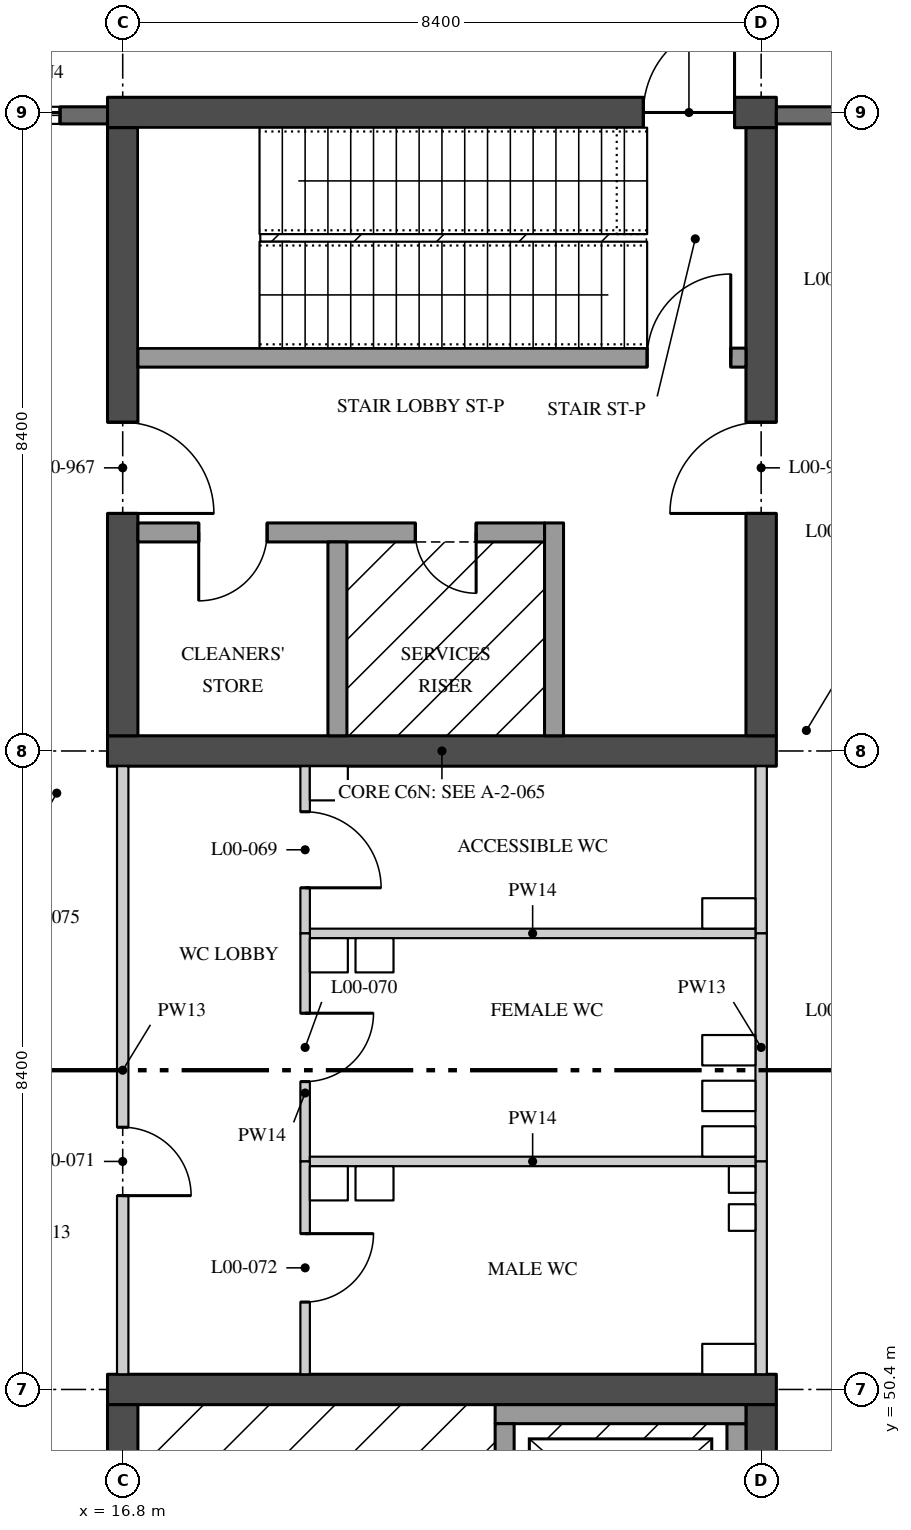
"""IFC4 building model, lengths in metres.
Left out: names, types, materials, properties, quantities, classifications, styles, units other than length and angle.
Written with IfcOpenShell. Run it as: python <this file> out.ifc"""

import sys

from ifc_helpers import new_model, si_unit, direction, frame, frame_2d, origin, place, context, subcontext, project, spatial, rectangle, extrude, element, fill, save


model = new_model("IFC4")
c1 = context("Model", 3, precision=1e-05, world=origin(), true_north=direction((0.0, 1.0)))
c2 = subcontext(c1, "Body", "Model", "MODEL_VIEW")
j1 = project(units=[si_unit("LENGTHUNIT", "METRE"), si_unit("PLANEANGLEUNIT", "RADIAN")], contexts=[c1])
p1 = place(None, origin())
s1 = spatial("IfcSite", under=j1, at=p1, CompositionType="ELEMENT")
p2 = place(p1, origin())
s2 = spatial("IfcBuilding", under=s1, at=p2, CompositionType="ELEMENT")
p3 = place(p2, origin())
s3 = spatial("IfcBuildingStorey", under=s2, at=p3, CompositionType="ELEMENT", Elevation=0.0)
p4 = place(p3, frame((16.6, 50.4, 0.0), z_axis=(0.0, 0.0, 1.0), x_axis=(1.0, 0.0, 0.0)))
e1 = element("IfcWall", 1, at=p4, inside=s3, PredefinedType="SHEAR", context=c2, shape_type="SweptSolid", body=[
    extrude(rectangle(XDim=8.8, YDim=0.4, at=frame_2d((4.4, 0.0))), origin(), (0.0, 0.0, 1.0), 5.05),
])
p5 = place(p3, frame((16.8, 42.2, 0.0), z_axis=(0.0, 0.0, 1.0), x_axis=(0.0, 1.0, 0.0)))
e2 = element("IfcWall", 2, at=p5, inside=s3, PredefinedType="SHEAR", context=c2, shape_type="SweptSolid", body=[
    extrude(rectangle(XDim=8.0, YDim=0.4, at=frame_2d((4.0, 0.0))), origin(), (0.0, 0.0, 1.0), 5.05),
])
p6 = place(p5, frame((3.55, 0.0, 0.0)))
e3 = element("IfcOpeningElement", 3, at=p6, cuts=e2, PredefinedType="OPENING", context=c2, shape_type="SweptSolid", body=[
    extrude(rectangle(XDim=1.2, YDim=2.1, at=frame_2d((0.6, 1.05))), frame((0.0, 0.21, 0.0), z_axis=(0.0, -1.0, 0.0), x_axis=(1.0, 0.0, 0.0)), (0.0, 0.0, 1.0), 0.42),
])
p7 = place(p5, frame((0.8, 0.0, 0.0)))
e4 = element("IfcOpeningElement", 4, at=p7, cuts=e2, PredefinedType="OPENING", context=c2, shape_type="SweptSolid", body=[
    extrude(rectangle(XDim=1.2, YDim=2.1, at=frame_2d((0.6, 1.05))), frame((0.0, 0.21, 0.0), z_axis=(0.0, -1.0, 0.0), x_axis=(1.0, 0.0, 0.0)), (0.0, 0.0, 1.0), 0.42),
])
p8 = place(p3, frame((25.2, 42.2, 0.0), z_axis=(0.0, 0.0, 1.0), x_axis=(0.0, 1.0, 0.0)))
e5 = element("IfcWall", 5, at=p8, inside=s3, PredefinedType="SHEAR", context=c2, shape_type="SweptSolid", body=[
    extrude(rectangle(XDim=8.0, YDim=0.4, at=frame_2d((4.0, 0.0))), origin(), (0.0, 0.0, 1.0), 5.05),
])
p9 = place(p8, frame((3.55, 0.0, 0.0)))
e6 = element("IfcOpeningElement", 6, at=p9, cuts=e5, PredefinedType="OPENING", context=c2, shape_type="SweptSolid", body=[
    extrude(rectangle(XDim=1.2, YDim=2.1, at=frame_2d((0.6, 1.05))), frame((0.0, 0.21, 0.0), z_axis=(0.0, -1.0, 0.0), x_axis=(1.0, 0.0, 0.0)), (0.0, 0.0, 1.0), 0.42),
])
p10 = place(p3, frame((16.6, 58.8, 0.0), z_axis=(0.0, 0.0, 1.0), x_axis=(1.0, 0.0, 0.0)))
e7 = element("IfcWall", 7, at=p10, inside=s3, PredefinedType="SHEAR", context=c2, shape_type="SweptSolid", body=[
    extrude(rectangle(XDim=8.8, YDim=0.4, at=frame_2d((4.4, 0.0))), origin(), (0.0, 0.0, 1.0), 5.05),
])
p11 = place(p3, frame((16.6, 67.2, 0.0), z_axis=(0.0, 0.0, 1.0), x_axis=(1.0, 0.0, 0.0)))
e8 = element("IfcWall", 8, at=p11, inside=s3, PredefinedType="SHEAR", context=c2, shape_type="SweptSolid", body=[
    extrude(rectangle(XDim=8.8, YDim=0.4, at=frame_2d((4.4, 0.0))), origin(), (0.0, 0.0, 1.0), 5.05),
])
p12 = place(p11, frame((7.05, 0.0, 0.0)))
e9 = element("IfcOpeningElement", 9, at=p12, cuts=e8, PredefinedType="OPENING", context=c2, shape_type="SweptSolid", body=[
    extrude(rectangle(XDim=1.2, YDim=2.1, at=frame_2d((0.6, 1.05))), frame((0.0, 0.21, 0.0), z_axis=(0.0, -1.0, 0.0), x_axis=(1.0, 0.0, 0.0)), (0.0, 0.0, 1.0), 0.42),
])
p13 = place(p3, frame((16.8, 59.0, 0.0), z_axis=(0.0, 0.0, 1.0), x_axis=(0.0, 1.0, 0.0)))
e10 = element("IfcWall", 10, at=p13, inside=s3, PredefinedType="SHEAR", context=c2, shape_type="SweptSolid", body=[
    extrude(rectangle(XDim=8.0, YDim=0.4, at=frame_2d((4.0, 0.0))), origin(), (0.0, 0.0, 1.0), 5.05),
])
p14 = place(p13, frame((2.925, 0.0, 0.0)))
e11 = element("IfcOpeningElement", 11, at=p14, cuts=e10, PredefinedType="OPENING", context=c2, shape_type="SweptSolid", body=[
    extrude(rectangle(XDim=1.2, YDim=2.1, at=frame_2d((0.6, 1.05))), frame((0.0, 0.21, 0.0), z_axis=(0.0, -1.0, 0.0), x_axis=(1.0, 0.0, 0.0)), (0.0, 0.0, 1.0), 0.42),
])
p15 = place(p3, frame((25.2, 59.0, 0.0), z_axis=(0.0, 0.0, 1.0), x_axis=(0.0, 1.0, 0.0)))
e12 = element("IfcWall", 12, at=p15, inside=s3, PredefinedType="SHEAR", context=c2, shape_type="SweptSolid", body=[
    extrude(rectangle(XDim=8.0, YDim=0.4, at=frame_2d((4.0, 0.0))), origin(), (0.0, 0.0, 1.0), 5.05),
])
p16 = place(p15, frame((2.925, 0.0, 0.0)))
e13 = element("IfcOpeningElement", 13, at=p16, cuts=e12, PredefinedType="OPENING", context=c2, shape_type="SweptSolid", body=[
    extrude(rectangle(XDim=1.2, YDim=2.1, at=frame_2d((0.6, 1.05))), frame((0.0, 0.21, 0.0), z_axis=(0.0, -1.0, 0.0), x_axis=(1.0, 0.0, 0.0)), (0.0, 0.0, 1.0), 0.42),
])
p17 = place(p3, frame((25.0, 63.975, 0.0), z_axis=(0.0, 0.0, 1.0), x_axis=(-1.0, 0.0, 0.0)))
e14 = element("IfcWall", 14, at=p17, inside=s3, PredefinedType="SOLIDWALL", context=c2, shape_type="SweptSolid", body=[
    extrude(rectangle(XDim=8.0, YDim=0.25, at=frame_2d((4.0, 0.0))), origin(), (0.0, 0.0, 1.0), 5.05),
])
p18 = place(p17, frame((0.2, 0.0, 0.0)))
e15 = element("IfcOpeningElement", 15, at=p18, cuts=e14, PredefinedType="OPENING", context=c2, shape_type="SweptSolid", body=[
    extrude(rectangle(XDim=1.1, YDim=2.1, at=frame_2d((0.55, 1.05))), frame((0.0, 0.135, 0.0), z_axis=(0.0, -1.0, 0.0), x_axis=(1.0, 0.0, 0.0)), (0.0, 0.0, 1.0), 0.27),
])
p19 = place(p3, frame((22.475, 61.8, 0.0), z_axis=(0.0, 0.0, 1.0), x_axis=(0.0, -1.0, 0.0)))
e16 = element("IfcWall", 16, at=p19, inside=s3, PredefinedType="SOLIDWALL", context=c2, shape_type="SweptSolid", body=[
    extrude(rectangle(XDim=2.8, YDim=0.25, at=frame_2d((1.4, 0.0))), origin(), (0.0, 0.0, 1.0), 5.05),
])
p20 = place(p3, frame((22.35, 61.675, 0.0), z_axis=(0.0, 0.0, 1.0), x_axis=(-1.0, 0.0, 0.0)))
e17 = element("IfcWall", 17, at=p20, inside=s3, PredefinedType="SOLIDWALL", context=c2, shape_type="SweptSolid", body=[
    extrude(rectangle(XDim=5.35, YDim=0.25, at=frame_2d((2.675, 0.0))), origin(), (0.0, 0.0, 1.0), 5.05),
])
p21 = place(p20, frame((3.65, 0.0, 0.0)))
e18 = element("IfcOpeningElement", 18, at=p21, cuts=e17, PredefinedType="OPENING", context=c2, shape_type="SweptSolid", body=[
    extrude(rectangle(XDim=0.9, YDim=2.1, at=frame_2d((0.45, 1.05))), frame((0.0, 0.135, 0.0), z_axis=(0.0, -1.0, 0.0), x_axis=(1.0, 0.0, 0.0)), (0.0, 0.0, 1.0), 0.27),
])
p22 = place(p20, frame((0.9, 0.0, 0.0)))
e19 = element("IfcOpeningElement", 19, at=p22, cuts=e17, PredefinedType="OPENING", context=c2, shape_type="SweptSolid", body=[
    extrude(rectangle(XDim=0.8, YDim=2.1, at=frame_2d((0.4, 1.05))), frame((0.0, 0.135, 0.0), z_axis=(0.0, -1.0, 0.0), x_axis=(1.0, 0.0, 0.0)), (0.0, 0.0, 1.0), 0.27),
])
p23 = place(p3, frame((19.625, 61.55, 0.0), z_axis=(0.0, 0.0, 1.0), x_axis=(0.0, -1.0, 0.0)))
e20 = element("IfcWall", 20, at=p23, inside=s3, PredefinedType="SOLIDWALL", context=c2, shape_type="SweptSolid", body=[
    extrude(rectangle(XDim=2.55, YDim=0.25, at=frame_2d((1.275, 0.0))), origin(), (0.0, 0.0, 1.0), 5.05),
])
p24 = place(p3, frame((24.875, 47.65, 0.0), z_axis=(0.0, 0.0, 1.0), x_axis=(0.0, 1.0, 0.0)))
e21 = element("IfcWall", 21, at=p24, inside=s3, PredefinedType="SOLIDWALL", context=c2, shape_type="SweptSolid", body=[
    extrude(rectangle(XDim=2.3, YDim=0.25, at=frame_2d((1.15, 0.0))), origin(), (0.0, 0.0, 1.0), 5.05),
])
p25 = place(p3, frame((21.7, 50.075, 0.0), z_axis=(0.0, 0.0, 1.0), x_axis=(1.0, 0.0, 0.0)))
e22 = element("IfcWall", 22, at=p25, inside=s3, PredefinedType="SOLIDWALL", context=c2, shape_type="SweptSolid", body=[
    extrude(rectangle(XDim=3.3, YDim=0.25, at=frame_2d((1.65, 0.0))), origin(), (0.0, 0.0, 1.0), 5.05),
])
p26 = place(p3, frame((21.825, 47.65, 0.0), z_axis=(0.0, 0.0, 1.0), x_axis=(0.0, 1.0, 0.0)))
e23 = element("IfcWall", 23, at=p26, inside=s3, PredefinedType="SOLIDWALL", context=c2, shape_type="SweptSolid", body=[
    extrude(rectangle(XDim=2.3, YDim=0.25, at=frame_2d((1.15, 0.0))), origin(), (0.0, 0.0, 1.0), 5.05),
])
p27 = place(p3, frame((25.2, 56.4, 0.0), z_axis=(0.0, 0.0, 1.0), x_axis=(0.0, 1.0, 0.0)))
e24 = element("IfcWall", 24, at=p27, inside=s3, PredefinedType="PARTITIONING", context=c2, shape_type="SweptSolid", body=[
    extrude(rectangle(XDim=2.2, YDim=0.15, at=frame_2d((1.1, 0.0))), origin(), (0.0, 0.0, 1.0), 5.05),
])
p28 = place(p3, frame((25.2, 53.4, 0.0), z_axis=(0.0, 0.0, 1.0), x_axis=(0.0, 1.0, 0.0)))
e25 = element("IfcWall", 25, at=p28, inside=s3, PredefinedType="PARTITIONING", context=c2, shape_type="SweptSolid", body=[
    extrude(rectangle(XDim=3.0, YDim=0.15, at=frame_2d((1.5, 0.0))), origin(), (0.0, 0.0, 1.0), 5.05),
])
p29 = place(p3, frame((25.2, 50.6, 0.0), z_axis=(0.0, 0.0, 1.0), x_axis=(0.0, 1.0, 0.0)))
e26 = element("IfcWall", 26, at=p29, inside=s3, PredefinedType="PARTITIONING", context=c2, shape_type="SweptSolid", body=[
    extrude(rectangle(XDim=2.8, YDim=0.15, at=frame_2d((1.4, 0.0))), origin(), (0.0, 0.0, 1.0), 5.05),
])
p30 = place(p3, frame((16.8, 50.6, 0.0), z_axis=(0.0, 0.0, 1.0), x_axis=(0.0, 1.0, 0.0)))
e27 = element("IfcWall", 27, at=p30, inside=s3, PredefinedType="PARTITIONING", context=c2, shape_type="SweptSolid", body=[
    extrude(rectangle(XDim=8.0, YDim=0.15, at=frame_2d((4.0, 0.0))), origin(), (0.0, 0.0, 1.0), 5.05),
])
p31 = place(p30, frame((2.35, 0.0, 0.0)))
e28 = element("IfcOpeningElement", 28, at=p31, cuts=e27, PredefinedType="OPENING", context=c2, shape_type="SweptSolid", body=[
    extrude(rectangle(XDim=0.9, YDim=2.1, at=frame_2d((0.45, 1.05))), frame((0.0, 0.085, 0.0), z_axis=(0.0, -1.0, 0.0), x_axis=(1.0, 0.0, 0.0)), (0.0, 0.0, 1.0), 0.17),
])
p32 = place(p3, frame((19.262, 56.4, 0.0), z_axis=(0.0, 0.0, 1.0), x_axis=(1.0, 0.0, 0.0)))
e29 = element("IfcWall", 29, at=p32, inside=s3, PredefinedType="PARTITIONING", context=c2, shape_type="SweptSolid", body=[
    extrude(rectangle(XDim=5.863, YDim=0.125, at=frame_2d((2.932, 0.0))), origin(), (0.0, 0.0, 1.0), 5.05),
])
p33 = place(p3, frame((19.2, 56.4, 0.0), z_axis=(0.0, 0.0, 1.0), x_axis=(0.0, 1.0, 0.0)))
e30 = element("IfcWall", 30, at=p33, inside=s3, PredefinedType="PARTITIONING", context=c2, shape_type="SweptSolid", body=[
    extrude(rectangle(XDim=2.2, YDim=0.125, at=frame_2d((1.1, 0.0))), origin(), (0.0, 0.0, 1.0), 5.05),
])
p34 = place(p33, frame((0.6, 0.0, 0.0)))
e31 = element("IfcOpeningElement", 31, at=p34, cuts=e30, PredefinedType="OPENING", context=c2, shape_type="SweptSolid", body=[
    extrude(rectangle(XDim=1.0, YDim=2.1, at=frame_2d((0.5, 1.05))), frame((0.0, 0.073, 0.0), z_axis=(0.0, -1.0, 0.0), x_axis=(1.0, 0.0, 0.0)), (0.0, 0.0, 1.0), 0.145),
])
p35 = place(p3, frame((19.2, 53.4, 0.0), z_axis=(0.0, 0.0, 1.0), x_axis=(0.0, 1.0, 0.0)))
e32 = element("IfcWall", 32, at=p35, inside=s3, PredefinedType="PARTITIONING", context=c2, shape_type="SweptSolid", body=[
    extrude(rectangle(XDim=3.0, YDim=0.125, at=frame_2d((1.5, 0.0))), origin(), (0.0, 0.0, 1.0), 5.05),
])
p36 = place(p35, frame((1.05, 0.0, 0.0)))
e33 = element("IfcOpeningElement", 33, at=p36, cuts=e32, PredefinedType="OPENING", context=c2, shape_type="SweptSolid", body=[
    extrude(rectangle(XDim=0.9, YDim=2.1, at=frame_2d((0.45, 1.05))), frame((0.0, 0.073, 0.0), z_axis=(0.0, -1.0, 0.0), x_axis=(1.0, 0.0, 0.0)), (0.0, 0.0, 1.0), 0.145),
])
p37 = place(p3, frame((19.262, 53.4, 0.0), z_axis=(0.0, 0.0, 1.0), x_axis=(1.0, 0.0, 0.0)))
e34 = element("IfcWall", 34, at=p37, inside=s3, PredefinedType="PARTITIONING", context=c2, shape_type="SweptSolid", body=[
    extrude(rectangle(XDim=5.863, YDim=0.125, at=frame_2d((2.932, 0.0))), origin(), (0.0, 0.0, 1.0), 5.05),
])
p38 = place(p3, frame((19.2, 50.6, 0.0), z_axis=(0.0, 0.0, 1.0), x_axis=(0.0, 1.0, 0.0)))
e35 = element("IfcWall", 35, at=p38, inside=s3, PredefinedType="PARTITIONING", context=c2, shape_type="SweptSolid", body=[
    extrude(rectangle(XDim=2.8, YDim=0.125, at=frame_2d((1.4, 0.0))), origin(), (0.0, 0.0, 1.0), 5.05),
])
p39 = place(p38, frame((0.95, 0.0, 0.0)))
e36 = element("IfcOpeningElement", 36, at=p39, cuts=e35, PredefinedType="OPENING", context=c2, shape_type="SweptSolid", body=[
    extrude(rectangle(XDim=0.9, YDim=2.1, at=frame_2d((0.45, 1.05))), frame((0.0, 0.073, 0.0), z_axis=(0.0, -1.0, 0.0), x_axis=(1.0, 0.0, 0.0)), (0.0, 0.0, 1.0), 0.145),
])
p40 = place(p3, frame((33.17, 67.163, 0.0), z_axis=(0.0, 0.0, 1.0), x_axis=(-1.0, 0.0, 0.0)))
e37 = element("IfcWall", 37, at=p40, inside=s3, PredefinedType="SOLIDWALL", context=c2, shape_type="SweptSolid", body=[
    extrude(rectangle(XDim=7.77, YDim=0.225, at=frame_2d((3.885, 0.0))), origin(), (0.0, 0.0, 1.0), 5.05),
])
p41 = place(p40, frame((0.395, 0.0, 1.2)))
e38 = element("IfcOpeningElement", 38, at=p41, cuts=e37, PredefinedType="OPENING", context=c2, shape_type="SweptSolid", body=[
    extrude(rectangle(XDim=0.45, YDim=2.85, at=frame_2d((0.225, 1.425))), frame((0.0, 0.123, 0.0), z_axis=(0.0, -1.0, 0.0), x_axis=(1.0, 0.0, 0.0)), (0.0, 0.0, 1.0), 0.245),
])
p42 = place(p40, frame((2.12, 0.0, 1.2)))
e39 = element("IfcOpeningElement", 39, at=p42, cuts=e37, PredefinedType="OPENING", context=c2, shape_type="SweptSolid", body=[
    extrude(rectangle(XDim=1.2, YDim=2.85, at=frame_2d((0.6, 1.425))), frame((0.0, 0.123, 0.0), z_axis=(0.0, -1.0, 0.0), x_axis=(1.0, 0.0, 0.0)), (0.0, 0.0, 1.0), 0.245),
])
p43 = place(p40, frame((4.595, 0.0, 1.2)))
e40 = element("IfcOpeningElement", 40, at=p43, cuts=e37, PredefinedType="OPENING", context=c2, shape_type="SweptSolid", body=[
    extrude(rectangle(XDim=0.45, YDim=2.85, at=frame_2d((0.225, 1.425))), frame((0.0, 0.123, 0.0), z_axis=(0.0, -1.0, 0.0), x_axis=(1.0, 0.0, 0.0)), (0.0, 0.0, 1.0), 0.245),
])
p44 = place(p3, frame((16.6, 67.163, 0.0), z_axis=(0.0, 0.0, 1.0), x_axis=(-1.0, 0.0, 0.0)))
e41 = element("IfcWall", 41, at=p44, inside=s3, PredefinedType="SOLIDWALL", context=c2, shape_type="SweptSolid", body=[
    extrude(rectangle(XDim=7.77, YDim=0.225, at=frame_2d((3.885, 0.0))), origin(), (0.0, 0.0, 1.0), 5.05),
])
p45 = place(p44, frame((0.625, 0.0, 1.2)))
e42 = element("IfcOpeningElement", 42, at=p45, cuts=e41, PredefinedType="OPENING", context=c2, shape_type="SweptSolid", body=[
    extrude(rectangle(XDim=0.45, YDim=2.85, at=frame_2d((0.225, 1.425))), frame((0.0, 0.123, 0.0), z_axis=(0.0, -1.0, 0.0), x_axis=(1.0, 0.0, 0.0)), (0.0, 0.0, 1.0), 0.245),
])
p46 = place(p44, frame((2.35, 0.0, 1.2)))
e43 = element("IfcOpeningElement", 43, at=p46, cuts=e41, PredefinedType="OPENING", context=c2, shape_type="SweptSolid", body=[
    extrude(rectangle(XDim=1.2, YDim=2.85, at=frame_2d((0.6, 1.425))), frame((0.0, 0.123, 0.0), z_axis=(0.0, -1.0, 0.0), x_axis=(1.0, 0.0, 0.0)), (0.0, 0.0, 1.0), 0.245),
])
p47 = place(p44, frame((4.825, 0.0, 1.2)))
e44 = element("IfcOpeningElement", 44, at=p47, cuts=e41, PredefinedType="OPENING", context=c2, shape_type="SweptSolid", body=[
    extrude(rectangle(XDim=0.45, YDim=2.85, at=frame_2d((0.225, 1.425))), frame((0.0, 0.123, 0.0), z_axis=(0.0, -1.0, 0.0), x_axis=(1.0, 0.0, 0.0)), (0.0, 0.0, 1.0), 0.245),
])
p48 = place(p21, origin())
e45 = element("IfcDoor", 45, at=p48, inside=s3, OperationType="SINGLE_SWING_LEFT", PredefinedType="DOOR", context=c2, shape_type="SweptSolid", body=[
    extrude(rectangle(XDim=0.9, YDim=2.1, at=frame_2d((0.45, 1.05))), frame((0.0, 0.035, 0.0), z_axis=(0.0, -1.0, 0.0), x_axis=(1.0, 0.0, 0.0)), (0.0, 0.0, 1.0), 0.07),
])
fill(e18, e45)
p49 = place(p14, frame((1.2, 0.0, 0.0), z_axis=(0.0, 0.0, 1.0), x_axis=(-1.0, 0.0, 0.0)))
e46 = element("IfcDoor", 46, at=p49, inside=s3, OperationType="SINGLE_SWING_LEFT", PredefinedType="DOOR", context=c2, shape_type="SweptSolid", body=[
    extrude(rectangle(XDim=1.2, YDim=2.1, at=frame_2d((0.6, 1.05))), frame((0.0, 0.035, 0.0), z_axis=(0.0, -1.0, 0.0), x_axis=(1.0, 0.0, 0.0)), (0.0, 0.0, 1.0), 0.07),
])
fill(e11, e46)
p50 = place(p16, origin())
e47 = element("IfcDoor", 47, at=p50, inside=s3, OperationType="SINGLE_SWING_RIGHT", PredefinedType="DOOR", context=c2, shape_type="SweptSolid", body=[
    extrude(rectangle(XDim=1.2, YDim=2.1, at=frame_2d((0.6, 1.05))), frame((0.0, 0.035, 0.0), z_axis=(0.0, -1.0, 0.0), x_axis=(1.0, 0.0, 0.0)), (0.0, 0.0, 1.0), 0.07),
])
fill(e13, e47)
p51 = place(p22, origin())
e48 = element("IfcDoor", 48, at=p51, inside=s3, OperationType="SINGLE_SWING_RIGHT", PredefinedType="DOOR", context=c2, shape_type="SweptSolid", body=[
    extrude(rectangle(XDim=0.8, YDim=2.1, at=frame_2d((0.4, 1.05))), frame((0.0, 0.035, 0.0), z_axis=(0.0, -1.0, 0.0), x_axis=(1.0, 0.0, 0.0)), (0.0, 0.0, 1.0), 0.07),
])
fill(e19, e48)
p52 = place(p18, frame((1.1, 0.0, 0.0), z_axis=(0.0, 0.0, 1.0), x_axis=(-1.0, 0.0, 0.0)))
e49 = element("IfcDoor", 49, at=p52, inside=s3, OperationType="SINGLE_SWING_LEFT", PredefinedType="DOOR", context=c2, shape_type="SweptSolid", body=[
    extrude(rectangle(XDim=1.1, YDim=2.1, at=frame_2d((0.55, 1.05))), frame((0.0, 0.035, 0.0), z_axis=(0.0, -1.0, 0.0), x_axis=(1.0, 0.0, 0.0)), (0.0, 0.0, 1.0), 0.07),
])
fill(e15, e49)
p53 = place(p12, origin())
e50 = element("IfcDoor", 50, at=p53, inside=s3, OperationType="SINGLE_SWING_LEFT", PredefinedType="DOOR", context=c2, shape_type="SweptSolid", body=[
    extrude(rectangle(XDim=1.2, YDim=2.1, at=frame_2d((0.6, 1.05))), frame((0.0, 0.035, 0.0), z_axis=(0.0, -1.0, 0.0), x_axis=(1.0, 0.0, 0.0)), (0.0, 0.0, 1.0), 0.07),
])
fill(e9, e50)
p54 = place(p34, frame((1.0, 0.0, 0.0), z_axis=(0.0, 0.0, 1.0), x_axis=(-1.0, 0.0, 0.0)))
e51 = element("IfcDoor", 51, at=p54, inside=s3, OperationType="SINGLE_SWING_LEFT", PredefinedType="DOOR", context=c2, shape_type="SweptSolid", body=[
    extrude(rectangle(XDim=1.0, YDim=2.1, at=frame_2d((0.5, 1.05))), frame((0.0, 0.02, 0.0), z_axis=(0.0, -1.0, 0.0), x_axis=(1.0, 0.0, 0.0)), (0.0, 0.0, 1.0), 0.04),
])
fill(e31, e51)
p55 = place(p36, frame((0.9, 0.0, 0.0), z_axis=(0.0, 0.0, 1.0), x_axis=(-1.0, 0.0, 0.0)))
e52 = element("IfcDoor", 52, at=p55, inside=s3, OperationType="SINGLE_SWING_RIGHT", PredefinedType="DOOR", context=c2, shape_type="SweptSolid", body=[
    extrude(rectangle(XDim=0.9, YDim=2.1, at=frame_2d((0.45, 1.05))), frame((0.0, 0.02, 0.0), z_axis=(0.0, -1.0, 0.0), x_axis=(1.0, 0.0, 0.0)), (0.0, 0.0, 1.0), 0.04),
])
fill(e33, e52)
p56 = place(p31, frame((0.9, 0.0, 0.0), z_axis=(0.0, 0.0, 1.0), x_axis=(-1.0, 0.0, 0.0)))
e53 = element("IfcDoor", 53, at=p56, inside=s3, OperationType="SINGLE_SWING_LEFT", PredefinedType="DOOR", context=c2, shape_type="SweptSolid", body=[
    extrude(rectangle(XDim=0.9, YDim=2.1, at=frame_2d((0.45, 1.05))), frame((0.0, 0.025, 0.0), z_axis=(0.0, -1.0, 0.0), x_axis=(1.0, 0.0, 0.0)), (0.0, 0.0, 1.0), 0.05),
])
fill(e28, e53)
p57 = place(p39, frame((0.9, 0.0, 0.0), z_axis=(0.0, 0.0, 1.0), x_axis=(-1.0, 0.0, 0.0)))
e54 = element("IfcDoor", 54, at=p57, inside=s3, OperationType="SINGLE_SWING_RIGHT", PredefinedType="DOOR", context=c2, shape_type="SweptSolid", body=[
    extrude(rectangle(XDim=0.9, YDim=2.1, at=frame_2d((0.45, 1.05))), frame((0.0, 0.02, 0.0), z_axis=(0.0, -1.0, 0.0), x_axis=(1.0, 0.0, 0.0)), (0.0, 0.0, 1.0), 0.04),
])
fill(e36, e54)
p58 = place(p45, origin())
e55 = element("IfcWindow", 55, at=p58, inside=s3, PartitioningType="SINGLE_PANEL", PredefinedType="WINDOW", context=c2, shape_type="SweptSolid", body=[
    extrude(rectangle(XDim=0.45, YDim=2.85, at=frame_2d((0.225, 1.425))), frame((0.0, 0.05, 0.0), z_axis=(0.0, -1.0, 0.0), x_axis=(1.0, 0.0, 0.0)), (0.0, 0.0, 1.0), 0.1),
])
fill(e42, e55)
save(model, sys.argv[1])
